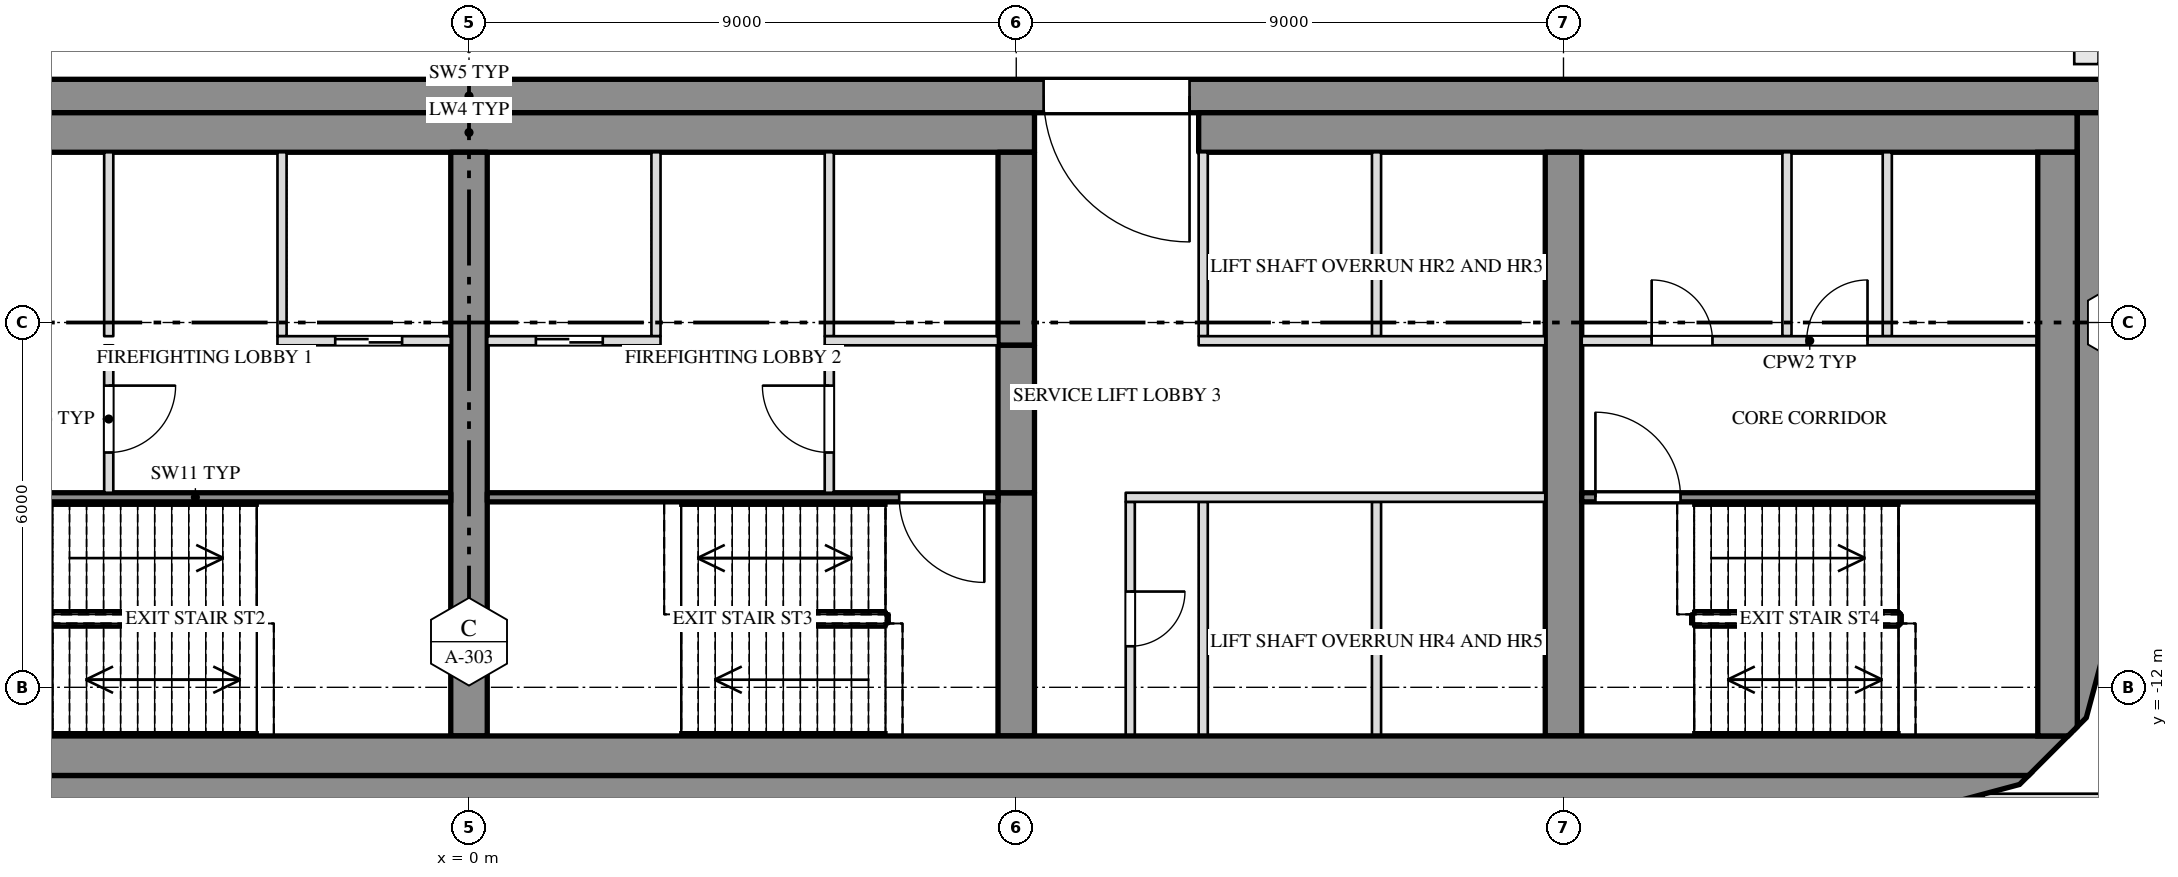
"""IFC4 building model, lengths in metres.
Left out: names, types, materials, properties, quantities, classifications, styles, units other than length and angle.
Written with IfcOpenShell. Run it as: python <this file> out.ifc"""

import sys

from ifc_helpers import new_model, si_unit, direction, frame, frame_2d, origin, place, context, subcontext, project, spatial, polyline, rectangle, outline, extrude, element, fill, save


model = new_model("IFC4")
c1 = context("Model", 3, precision=1e-05, world=origin(), true_north=direction((0.0, 1.0)))
c2 = subcontext(c1, "Body", "Model", "MODEL_VIEW")
j1 = project(units=[si_unit("LENGTHUNIT", "METRE"), si_unit("PLANEANGLEUNIT", "RADIAN")], contexts=[c1])
p1 = place(None, origin())
s1 = spatial("IfcSite", under=j1, at=p1, CompositionType="ELEMENT")
p2 = place(p1, origin())
s2 = spatial("IfcBuilding", under=s1, at=p2, CompositionType="ELEMENT")
p3 = place(p2, frame((0.0, 0.0, 296.5)))
s3 = spatial("IfcBuildingStorey", under=s2, at=p3, CompositionType="ELEMENT", Elevation=296.5)
p4 = place(p3, frame((-27.0, -2.275, 0.0), z_axis=(0.0, 0.0, 1.0), x_axis=(1.0, 0.0, 0.0)))
e1 = element("IfcWall", 1, at=p4, inside=s3, PredefinedType="SHEAR", context=c2, shape_type="SweptSolid", body=[
    extrude(rectangle(XDim=54.0, YDim=0.55, at=frame_2d((27.0, 0.0))), origin(), (0.0, 0.0, 1.0), 8.65),
])
p5 = place(p4, frame((15.15, 0.0, 0.0)))
e2 = element("IfcOpeningElement", 2, at=p5, cuts=e1, PredefinedType="OPENING", context=c2, shape_type="SweptSolid", body=[
    extrude(rectangle(XDim=2.4, YDim=2.1, at=frame_2d((1.2, 1.05))), frame((0.0, 0.287, 0.0), z_axis=(0.0, -1.0, 0.0), x_axis=(1.0, 0.0, 0.0)), (0.0, 0.0, 1.0), 0.574),
])
p6 = place(p4, frame((36.45, 0.0, 0.0)))
e3 = element("IfcOpeningElement", 3, at=p6, cuts=e1, PredefinedType="OPENING", context=c2, shape_type="SweptSolid", body=[
    extrude(rectangle(XDim=2.4, YDim=2.1, at=frame_2d((1.2, 1.05))), frame((0.0, 0.287, 0.0), z_axis=(0.0, -1.0, 0.0), x_axis=(1.0, 0.0, 0.0)), (0.0, 0.0, 1.0), 0.574),
])
p7 = place(p3, origin())
e4 = element("IfcWall", 4, at=p7, inside=s3, PredefinedType="SHEAR", context=c2, shape_type="SweptSolid", body=[
    extrude(outline(polyline([(25.648, -13.45), (25.5, -13.598), (24.0, -14.0), (-24.0, -14.0), (-25.5, -13.598), (-25.648, -13.45), (25.648, -13.45)])), origin(), (0.0, 0.0, 1.0), 8.65),
])
p8 = place(p3, origin())
e5 = element("IfcWall", 5, at=p8, inside=s3, PredefinedType="SHEAR", context=c2, shape_type="SweptSolid", body=[
    extrude(outline(polyline([(27.0, -11.0), (26.598, -12.5), (26.45, -12.648), (26.45, -2.55), (27.0, -2.55), (27.0, -11.0)])), origin(), (0.0, 0.0, 1.0), 8.65),
])
p9 = place(p3, frame((-9.3, -2.875, 0.0), z_axis=(0.0, 0.0, 1.0), x_axis=(1.0, 0.0, 0.0)))
e6 = element("IfcWall", 6, at=p9, inside=s3, PredefinedType="SHEAR", context=c2, shape_type="SweptSolid", body=[
    extrude(rectangle(XDim=18.6, YDim=0.65, at=frame_2d((9.3, 0.0))), origin(), (0.0, 0.0, 1.0), 8.65),
])
p10 = place(p3, frame((12.0, -2.875, 0.0), z_axis=(0.0, 0.0, 1.0), x_axis=(1.0, 0.0, 0.0)))
e7 = element("IfcWall", 7, at=p10, inside=s3, PredefinedType="SHEAR", context=c2, shape_type="SweptSolid", body=[
    extrude(rectangle(XDim=14.45, YDim=0.65, at=frame_2d((7.225, 0.0))), origin(), (0.0, 0.0, 1.0), 8.65),
])
p11 = place(p3, origin())
e8 = element("IfcWall", 8, at=p11, inside=s3, PredefinedType="SHEAR", context=c2, shape_type="SweptSolid", body=[
    extrude(outline(polyline([(26.298, -12.8), (25.648, -13.45), (-25.648, -13.45), (-26.298, -12.8), (26.298, -12.8)])), origin(), (0.0, 0.0, 1.0), 8.65),
])
p12 = place(p3, origin())
e9 = element("IfcWall", 9, at=p12, inside=s3, PredefinedType="SHEAR", context=c2, shape_type="SweptSolid", body=[
    extrude(outline(polyline([(25.8, -12.8), (25.8, -3.2), (26.45, -3.2), (26.45, -12.648), (26.298, -12.8), (25.8, -12.8)])), origin(), (0.0, 0.0, 1.0), 8.65),
])
p13 = place(p3, frame((0.0, -12.8, 0.0), z_axis=(0.0, 0.0, 1.0), x_axis=(0.0, 1.0, 0.0)))
e10 = element("IfcWall", 10, at=p13, inside=s3, PredefinedType="SHEAR", context=c2, shape_type="SweptSolid", body=[
    extrude(rectangle(XDim=9.6, YDim=0.6, at=frame_2d((4.8, 0.0))), origin(), (0.0, 0.0, 1.0), 8.65),
])
p14 = place(p3, frame((9.0, -12.8, 0.0), z_axis=(0.0, 0.0, 1.0), x_axis=(0.0, 1.0, 0.0)))
e11 = element("IfcWall", 11, at=p14, inside=s3, PredefinedType="SHEAR", context=c2, shape_type="SweptSolid", body=[
    extrude(rectangle(XDim=4.0, YDim=0.6, at=frame_2d((2.0, 0.0))), origin(), (0.0, 0.0, 1.0), 8.65),
])
p15 = place(p3, frame((9.0, -6.375, 0.0), z_axis=(0.0, 0.0, 1.0), x_axis=(0.0, 1.0, 0.0)))
e12 = element("IfcWall", 12, at=p15, inside=s3, PredefinedType="SHEAR", context=c2, shape_type="SweptSolid", body=[
    extrude(rectangle(XDim=3.175, YDim=0.6, at=frame_2d((1.587, 0.0))), origin(), (0.0, 0.0, 1.0), 8.65),
])
p16 = place(p3, frame((9.0, -8.8, 3.6), z_axis=(0.0, 0.0, 1.0), x_axis=(0.0, 1.0, 0.0)))
e13 = element("IfcWall", 13, at=p16, inside=s3, PredefinedType="SHEAR", context=c2, shape_type="SweptSolid", body=[
    extrude(rectangle(XDim=2.425, YDim=0.6, at=frame_2d((1.212, 0.0))), origin(), (0.0, 0.0, 1.0), 5.05),
])
p17 = place(p3, frame((18.0, -12.8, 0.0), z_axis=(0.0, 0.0, 1.0), x_axis=(0.0, 1.0, 0.0)))
e14 = element("IfcWall", 14, at=p17, inside=s3, PredefinedType="SHEAR", context=c2, shape_type="SweptSolid", body=[
    extrude(rectangle(XDim=9.6, YDim=0.6, at=frame_2d((4.8, 0.0))), origin(), (0.0, 0.0, 1.0), 8.65),
])
p18 = place(p3, frame((24.91, -13.875, 0.0), z_axis=(0.0, 0.0, 1.0), x_axis=(1.0, 0.0, 0.0)))
e15 = element("IfcWall", 15, at=p18, inside=s3, PredefinedType="PARAPET", context=c2, shape_type="SweptSolid", body=[
    extrude(rectangle(XDim=2.057, YDim=0.25, at=frame_2d((1.028, 0.0))), origin(), (0.0, 0.0, 1.0), 1.1),
])
for number, where, z_axis, x_axis in (
    (16, (-3.075, -6.225, 0.0), (0.0, 0.0, 1.0), (0.0, 1.0, 0.0)),
    (17, (-5.925, -6.225, 0.0), (0.0, 0.0, 1.0), (0.0, 1.0, 0.0)),
    (18, (3.075, -6.225, 0.0), (0.0, 0.0, 1.0), (0.0, 1.0, 0.0)),
    (19, (5.925, -6.225, 0.0), (0.0, 0.0, 1.0), (0.0, 1.0, 0.0)),
    (20, (12.075, -6.225, 0.0), (0.0, 0.0, 1.0), (0.0, 1.0, 0.0)),
    (21, (14.925, -6.225, 0.0), (0.0, 0.0, 1.0), (0.0, 1.0, 0.0)),
    (22, (21.675, -6.225, 0.0), (0.0, 0.0, 1.0), (0.0, 1.0, 0.0)),
    (23, (23.325, -6.225, 0.0), (0.0, 0.0, 1.0), (0.0, 1.0, 0.0)),
):
    element("IfcWall", number, at=place(p3, frame(where, z_axis=z_axis, x_axis=x_axis)), inside=s3, PredefinedType="PARTITIONING", context=c2, shape_type="SweptSolid", body=[
        extrude(rectangle(XDim=3.025, YDim=0.15, at=frame_2d((1.513, 0.0))), origin(), (0.0, 0.0, 1.0), 8.65),
    ])
p19 = place(p3, frame((10.875, -12.8, 0.0), z_axis=(0.0, 0.0, 1.0), x_axis=(0.0, 1.0, 0.0)))
e24 = element("IfcWall", 24, at=p19, inside=s3, PredefinedType="PARTITIONING", context=c2, shape_type="SweptSolid", body=[
    extrude(rectangle(XDim=3.85, YDim=0.15, at=frame_2d((1.925, 0.0))), origin(), (0.0, 0.0, 1.0), 8.65),
])
p20 = place(p19, frame((1.475, 0.0, 0.0)))
e25 = element("IfcOpeningElement", 25, at=p20, cuts=e24, PredefinedType="OPENING", context=c2, shape_type="SweptSolid", body=[
    extrude(rectangle(XDim=0.9, YDim=2.1, at=frame_2d((0.45, 1.05))), frame((0.0, 0.087, 0.0), z_axis=(0.0, -1.0, 0.0), x_axis=(1.0, 0.0, 0.0)), (0.0, 0.0, 1.0), 0.174),
])
for number, where, z_axis, x_axis in (
    (26, (12.075, -12.8, 0.0), (0.0, 0.0, 1.0), (0.0, 1.0, 0.0)),
    (27, (14.925, -12.8, 0.0), (0.0, 0.0, 1.0), (0.0, 1.0, 0.0)),
):
    element("IfcWall", number, at=place(p3, frame(where, z_axis=z_axis, x_axis=x_axis)), inside=s3, PredefinedType="PARTITIONING", context=c2, shape_type="SweptSolid", body=[
        extrude(rectangle(XDim=3.85, YDim=0.15, at=frame_2d((1.925, 0.0))), origin(), (0.0, 0.0, 1.0), 8.65),
    ])
p21 = place(p3, frame((-5.925, -8.8, 0.0), z_axis=(0.0, 0.0, 1.0), x_axis=(0.0, 1.0, 0.0)))
e28 = element("IfcWall", 28, at=p21, inside=s3, PredefinedType="PARTITIONING", context=c2, shape_type="SweptSolid", body=[
    extrude(rectangle(XDim=2.425, YDim=0.15, at=frame_2d((1.212, 0.0))), origin(), (0.0, 0.0, 1.0), 8.65),
])
p22 = place(p21, frame((0.662, 0.0, 0.0)))
e29 = element("IfcOpeningElement", 29, at=p22, cuts=e28, PredefinedType="OPENING", context=c2, shape_type="SweptSolid", body=[
    extrude(rectangle(XDim=1.1, YDim=2.1, at=frame_2d((0.55, 1.05))), frame((0.0, 0.087, 0.0), z_axis=(0.0, -1.0, 0.0), x_axis=(1.0, 0.0, 0.0)), (0.0, 0.0, 1.0), 0.174),
])
p23 = place(p3, frame((5.925, -8.8, 0.0), z_axis=(0.0, 0.0, 1.0), x_axis=(0.0, 1.0, 0.0)))
e30 = element("IfcWall", 30, at=p23, inside=s3, PredefinedType="PARTITIONING", context=c2, shape_type="SweptSolid", body=[
    extrude(rectangle(XDim=2.425, YDim=0.15, at=frame_2d((1.212, 0.0))), origin(), (0.0, 0.0, 1.0), 8.65),
])
p24 = place(p23, frame((0.662, 0.0, 0.0)))
e31 = element("IfcOpeningElement", 31, at=p24, cuts=e30, PredefinedType="OPENING", context=c2, shape_type="SweptSolid", body=[
    extrude(rectangle(XDim=1.1, YDim=2.1, at=frame_2d((0.55, 1.05))), frame((0.0, 0.087, 0.0), z_axis=(0.0, -1.0, 0.0), x_axis=(1.0, 0.0, 0.0)), (0.0, 0.0, 1.0), 0.174),
])
p25 = place(p3, frame((-3.15, -6.3, 0.0), z_axis=(0.0, 0.0, 1.0), x_axis=(1.0, 0.0, 0.0)))
e32 = element("IfcWall", 32, at=p25, inside=s3, PredefinedType="PARTITIONING", context=c2, shape_type="SweptSolid", body=[
    extrude(rectangle(XDim=2.85, YDim=0.15, at=frame_2d((1.425, 0.0))), origin(), (0.0, 0.0, 1.0), 8.65),
])
p26 = place(p25, frame((0.95, 0.0, 0.0)))
e33 = element("IfcOpeningElement", 33, at=p26, cuts=e32, PredefinedType="OPENING", context=c2, shape_type="SweptSolid", body=[
    extrude(rectangle(XDim=1.1, YDim=2.1, at=frame_2d((0.55, 1.05))), frame((0.0, 0.087, 0.0), z_axis=(0.0, -1.0, 0.0), x_axis=(1.0, 0.0, 0.0)), (0.0, 0.0, 1.0), 0.174),
])
p27 = place(p3, frame((0.3, -6.3, 0.0), z_axis=(0.0, 0.0, 1.0), x_axis=(1.0, 0.0, 0.0)))
e34 = element("IfcWall", 34, at=p27, inside=s3, PredefinedType="PARTITIONING", context=c2, shape_type="SweptSolid", body=[
    extrude(rectangle(XDim=2.85, YDim=0.15, at=frame_2d((1.425, 0.0))), origin(), (0.0, 0.0, 1.0), 8.65),
])
p28 = place(p27, frame((0.8, 0.0, 0.0)))
e35 = element("IfcOpeningElement", 35, at=p28, cuts=e34, PredefinedType="OPENING", context=c2, shape_type="SweptSolid", body=[
    extrude(rectangle(XDim=1.1, YDim=2.1, at=frame_2d((0.55, 1.05))), frame((0.0, 0.087, 0.0), z_axis=(0.0, -1.0, 0.0), x_axis=(1.0, 0.0, 0.0)), (0.0, 0.0, 1.0), 0.174),
])
p29 = place(p3, frame((5.85, -6.3, 0.0), z_axis=(0.0, 0.0, 1.0), x_axis=(1.0, 0.0, 0.0)))
e36 = element("IfcWall", 36, at=p29, inside=s3, PredefinedType="PARTITIONING", context=c2, shape_type="SweptSolid", body=[
    extrude(rectangle(XDim=2.85, YDim=0.15, at=frame_2d((1.425, 0.0))), origin(), (0.0, 0.0, 1.0), 8.65),
])
p30 = place(p3, frame((12.0, -6.3, 0.0), z_axis=(0.0, 0.0, 1.0), x_axis=(1.0, 0.0, 0.0)))
e37 = element("IfcWall", 37, at=p30, inside=s3, PredefinedType="PARTITIONING", context=c2, shape_type="SweptSolid", body=[
    extrude(rectangle(XDim=5.7, YDim=0.15, at=frame_2d((2.85, 0.0))), origin(), (0.0, 0.0, 1.0), 8.65),
])
p31 = place(p3, frame((18.3, -6.3, 0.0), z_axis=(0.0, 0.0, 1.0), x_axis=(1.0, 0.0, 0.0)))
e38 = element("IfcWall", 38, at=p31, inside=s3, PredefinedType="PARTITIONING", context=c2, shape_type="SweptSolid", body=[
    extrude(rectangle(XDim=7.5, YDim=0.15, at=frame_2d((3.75, 0.0))), origin(), (0.0, 0.0, 1.0), 8.65),
])
p32 = place(p31, frame((1.15, 0.0, 0.0)))
e39 = element("IfcOpeningElement", 39, at=p32, cuts=e38, PredefinedType="OPENING", context=c2, shape_type="SweptSolid", body=[
    extrude(rectangle(XDim=1.0, YDim=2.1, at=frame_2d((0.5, 1.05))), frame((0.0, 0.087, 0.0), z_axis=(0.0, -1.0, 0.0), x_axis=(1.0, 0.0, 0.0)), (0.0, 0.0, 1.0), 0.174),
])
p33 = place(p31, frame((3.7, 0.0, 0.0)))
e40 = element("IfcOpeningElement", 40, at=p33, cuts=e38, PredefinedType="OPENING", context=c2, shape_type="SweptSolid", body=[
    extrude(rectangle(XDim=1.0, YDim=2.1, at=frame_2d((0.5, 1.05))), frame((0.0, 0.087, 0.0), z_axis=(0.0, -1.0, 0.0), x_axis=(1.0, 0.0, 0.0)), (0.0, 0.0, 1.0), 0.174),
])
p34 = place(p3, frame((-8.7, -8.875, 0.0), z_axis=(0.0, 0.0, 1.0), x_axis=(1.0, 0.0, 0.0)))
e41 = element("IfcWall", 41, at=p34, inside=s3, PredefinedType="SHEAR", context=c2, shape_type="SweptSolid", body=[
    extrude(rectangle(XDim=8.4, YDim=0.15, at=frame_2d((4.2, 0.0))), origin(), (0.0, 0.0, 1.0), 8.65),
])
p35 = place(p34, frame((0.225, 0.0, 0.0)))
e42 = element("IfcOpeningElement", 42, at=p35, cuts=e41, PredefinedType="OPENING", context=c2, shape_type="SweptSolid", body=[
    extrude(rectangle(XDim=1.4, YDim=2.1, at=frame_2d((0.7, 1.05))), frame((0.0, 0.087, 0.0), z_axis=(0.0, -1.0, 0.0), x_axis=(1.0, 0.0, 0.0)), (0.0, 0.0, 1.0), 0.174),
])
p36 = place(p3, frame((0.3, -8.875, 0.0), z_axis=(0.0, 0.0, 1.0), x_axis=(1.0, 0.0, 0.0)))
e43 = element("IfcWall", 43, at=p36, inside=s3, PredefinedType="SHEAR", context=c2, shape_type="SweptSolid", body=[
    extrude(rectangle(XDim=8.4, YDim=0.15, at=frame_2d((4.2, 0.0))), origin(), (0.0, 0.0, 1.0), 8.65),
])
p37 = place(p36, frame((6.775, 0.0, 0.0)))
e44 = element("IfcOpeningElement", 44, at=p37, cuts=e43, PredefinedType="OPENING", context=c2, shape_type="SweptSolid", body=[
    extrude(rectangle(XDim=1.4, YDim=2.1, at=frame_2d((0.7, 1.05))), frame((0.0, 0.087, 0.0), z_axis=(0.0, -1.0, 0.0), x_axis=(1.0, 0.0, 0.0)), (0.0, 0.0, 1.0), 0.174),
])
p38 = place(p3, frame((10.8, -8.875, 0.0), z_axis=(0.0, 0.0, 1.0), x_axis=(1.0, 0.0, 0.0)))
e45 = element("IfcWall", 45, at=p38, inside=s3, PredefinedType="PARTITIONING", context=c2, shape_type="SweptSolid", body=[
    extrude(rectangle(XDim=6.9, YDim=0.15, at=frame_2d((3.45, 0.0))), origin(), (0.0, 0.0, 1.0), 8.65),
])
p39 = place(p3, frame((18.3, -8.875, 0.0), z_axis=(0.0, 0.0, 1.0), x_axis=(1.0, 0.0, 0.0)))
e46 = element("IfcWall", 46, at=p39, inside=s3, PredefinedType="SHEAR", context=c2, shape_type="SweptSolid", body=[
    extrude(rectangle(XDim=7.5, YDim=0.15, at=frame_2d((3.75, 0.0))), origin(), (0.0, 0.0, 1.0), 8.65),
])
p40 = place(p39, frame((0.225, 0.0, 0.0)))
e47 = element("IfcOpeningElement", 47, at=p40, cuts=e46, PredefinedType="OPENING", context=c2, shape_type="SweptSolid", body=[
    extrude(rectangle(XDim=1.4, YDim=2.1, at=frame_2d((0.7, 1.05))), frame((0.0, 0.087, 0.0), z_axis=(0.0, -1.0, 0.0), x_axis=(1.0, 0.0, 0.0)), (0.0, 0.0, 1.0), 0.174),
])
p41 = place(p22, origin())
e48 = element("IfcDoor", 48, at=p41, inside=s3, OperationType="SINGLE_SWING_LEFT", PredefinedType="DOOR", context=c2, shape_type="SweptSolid", body=[
    extrude(rectangle(XDim=1.1, YDim=2.1, at=frame_2d((0.55, 1.05))), frame((0.0, 0.025, 0.0), z_axis=(0.0, -1.0, 0.0), x_axis=(1.0, 0.0, 0.0)), (0.0, 0.0, 1.0), 0.05),
])
fill(e29, e48)
p42 = place(p26, origin())
e49 = element("IfcDoor", 49, at=p42, inside=s3, OperationType="SLIDING_TO_RIGHT", PredefinedType="DOOR", context=c2, shape_type="SweptSolid", body=[
    extrude(rectangle(XDim=1.1, YDim=2.1, at=frame_2d((0.55, 1.05))), frame((0.0, 0.025, 0.0), z_axis=(0.0, -1.0, 0.0), x_axis=(1.0, 0.0, 0.0)), (0.0, 0.0, 1.0), 0.05),
])
fill(e33, e49)
p43 = place(p28, origin())
e50 = element("IfcDoor", 50, at=p43, inside=s3, OperationType="SLIDING_TO_LEFT", PredefinedType="DOOR", context=c2, shape_type="SweptSolid", body=[
    extrude(rectangle(XDim=1.1, YDim=2.1, at=frame_2d((0.55, 1.05))), frame((0.0, 0.025, 0.0), z_axis=(0.0, -1.0, 0.0), x_axis=(1.0, 0.0, 0.0)), (0.0, 0.0, 1.0), 0.05),
])
fill(e35, e50)
p44 = place(p24, origin())
e51 = element("IfcDoor", 51, at=p44, inside=s3, OperationType="SINGLE_SWING_RIGHT", PredefinedType="DOOR", context=c2, shape_type="SweptSolid", body=[
    extrude(rectangle(XDim=1.1, YDim=2.1, at=frame_2d((0.55, 1.05))), frame((0.0, 0.025, 0.0), z_axis=(0.0, -1.0, 0.0), x_axis=(1.0, 0.0, 0.0)), (0.0, 0.0, 1.0), 0.05),
])
fill(e31, e51)
p45 = place(p37, origin())
e52 = element("IfcDoor", 52, at=p45, inside=s3, OperationType="DOUBLE_DOOR_SINGLE_SWING", PredefinedType="DOOR", context=c2, shape_type="SweptSolid", body=[
    extrude(rectangle(XDim=1.4, YDim=2.1, at=frame_2d((0.7, 1.05))), frame((0.0, 0.025, 0.0), z_axis=(0.0, -1.0, 0.0), x_axis=(1.0, 0.0, 0.0)), (0.0, 0.0, 1.0), 0.05),
])
fill(e44, e52)
p46 = place(p6, origin())
e53 = element("IfcDoor", 53, at=p46, inside=s3, OperationType="DOUBLE_DOOR_SINGLE_SWING", PredefinedType="DOOR", context=c2, shape_type="SweptSolid", body=[
    extrude(rectangle(XDim=2.4, YDim=2.1, at=frame_2d((1.2, 1.05))), frame((0.0, 0.025, 0.0), z_axis=(0.0, -1.0, 0.0), x_axis=(1.0, 0.0, 0.0)), (0.0, 0.0, 1.0), 0.05),
])
fill(e3, e53)
p47 = place(p20, origin())
e54 = element("IfcDoor", 54, at=p47, inside=s3, OperationType="SINGLE_SWING_LEFT", PredefinedType="DOOR", context=c2, shape_type="SweptSolid", body=[
    extrude(rectangle(XDim=0.9, YDim=2.1, at=frame_2d((0.45, 1.05))), frame((0.0, 0.025, 0.0), z_axis=(0.0, -1.0, 0.0), x_axis=(1.0, 0.0, 0.0)), (0.0, 0.0, 1.0), 0.05),
])
fill(e25, e54)
p48 = place(p40, origin())
e55 = element("IfcDoor", 55, at=p48, inside=s3, OperationType="DOUBLE_DOOR_SINGLE_SWING", PredefinedType="DOOR", context=c2, shape_type="SweptSolid", body=[
    extrude(rectangle(XDim=1.4, YDim=2.1, at=frame_2d((0.7, 1.05))), frame((0.0, 0.025, 0.0), z_axis=(0.0, -1.0, 0.0), x_axis=(1.0, 0.0, 0.0)), (0.0, 0.0, 1.0), 0.05),
])
fill(e47, e55)
p49 = place(p32, origin())
e56 = element("IfcDoor", 56, at=p49, inside=s3, OperationType="SINGLE_SWING_LEFT", PredefinedType="DOOR", context=c2, shape_type="SweptSolid", body=[
    extrude(rectangle(XDim=1.0, YDim=2.1, at=frame_2d((0.5, 1.05))), frame((0.0, 0.025, 0.0), z_axis=(0.0, -1.0, 0.0), x_axis=(1.0, 0.0, 0.0)), (0.0, 0.0, 1.0), 0.05),
])
fill(e39, e56)
p50 = place(p33, origin())
e57 = element("IfcDoor", 57, at=p50, inside=s3, OperationType="SINGLE_SWING_RIGHT", PredefinedType="DOOR", context=c2, shape_type="SweptSolid", body=[
    extrude(rectangle(XDim=1.0, YDim=2.1, at=frame_2d((0.5, 1.05))), frame((0.0, 0.025, 0.0), z_axis=(0.0, -1.0, 0.0), x_axis=(1.0, 0.0, 0.0)), (0.0, 0.0, 1.0), 0.05),
])
fill(e40, e57)
save(model, sys.argv[1])
